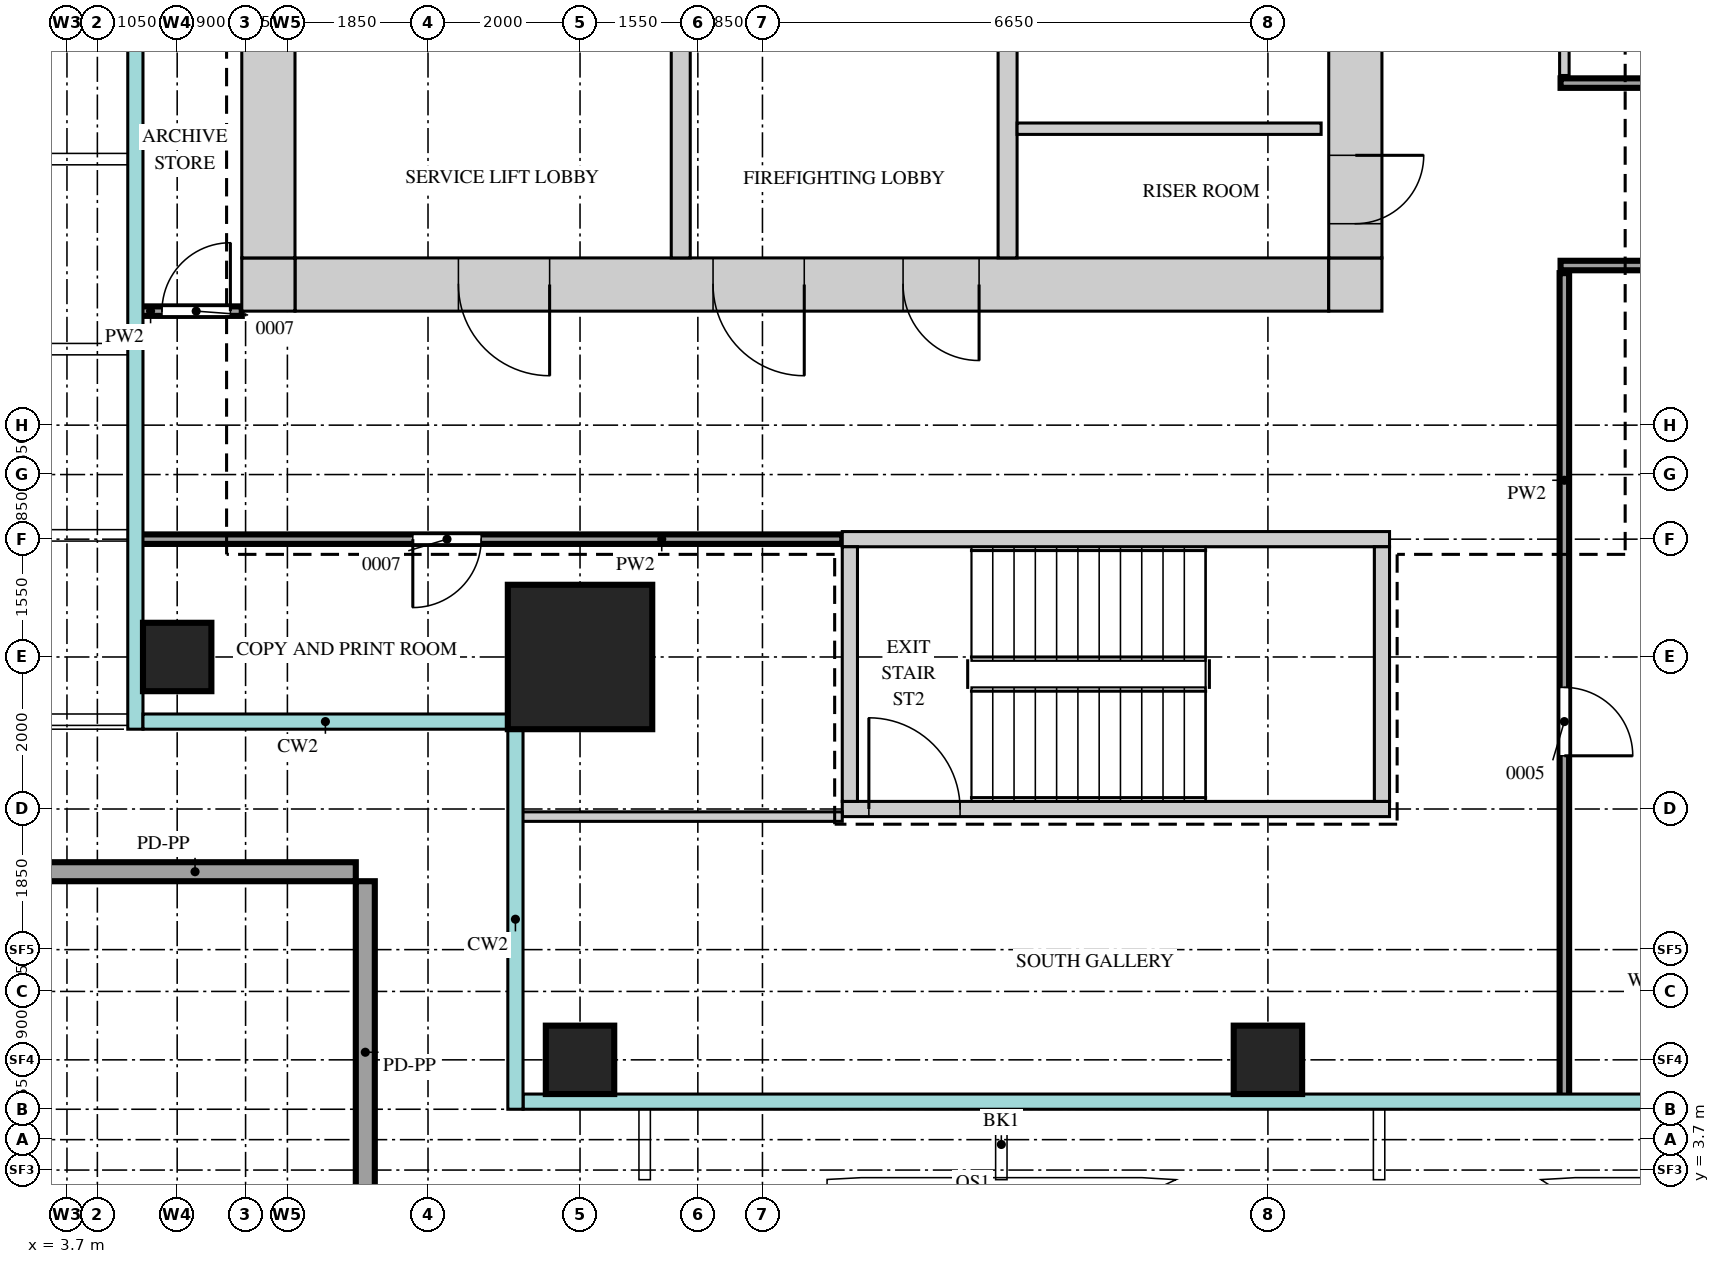
"""IFC4 building model, lengths in metres.
Left out: names, types, materials, properties, quantities, classifications, styles, units other than length and angle.
Written with IfcOpenShell. Run it as: python <this file> out.ifc"""

import sys

from ifc_helpers import new_model, si_unit, direction, frame, frame_2d, origin, origin_2d, place, context, subcontext, project, spatial, rectangle, extrude, source, transform, mapped, element, fill, save


model = new_model("IFC4")
c1 = context("Model", 3, precision=1e-05, world=origin(), true_north=direction((0.0, 1.0)))
c2 = subcontext(c1, "Body", "Model", "MODEL_VIEW")
j1 = project(units=[si_unit("LENGTHUNIT", "METRE"), si_unit("PLANEANGLEUNIT", "RADIAN")], contexts=[c1])
p1 = place(None, origin())
s1 = spatial("IfcSite", under=j1, at=p1, CompositionType="ELEMENT")
p2 = place(p1, origin())
s2 = spatial("IfcBuilding", under=s1, at=p2, CompositionType="ELEMENT")
p3 = place(p2, frame((0.0, 0.0, 222.2)))
s3 = spatial("IfcBuildingStorey", under=s2, at=p3, CompositionType="ELEMENT", Elevation=222.2)
m1 = source(origin(), c2, "Body", "SweptSolid", [
    extrude(rectangle(XDim=13.6, YDim=0.7, at=frame_2d((6.8, 0.0))), origin(), (0.0, 0.0, 1.0), 3.75),
])
p4 = place(p3, frame((6.7, 15.35, 0.0), z_axis=(0.0, 0.0, 1.0), x_axis=(1.0, 0.0, 0.0)))
e1 = element("IfcWall", 1, at=p4, inside=s3, PredefinedType="SHEAR", context=c2, shape_type="MappedRepresentation", body=[
    mapped(m1, transform((0.0, 0.0, 0.0))),
])
m2 = source(origin(), c2, "Body", "SweptSolid", [
    extrude(rectangle(XDim=1.2, YDim=2.1, at=frame_2d((0.6, 1.05))), frame((0.0, 0.36, 0.0), z_axis=(0.0, -1.0, 0.0), x_axis=(1.0, 0.0, 0.0)), (0.0, 0.0, 1.0), 0.72),
])
p5 = place(p4, frame((5.5, 0.0, 0.0)))
e2 = element("IfcOpeningElement", 2, at=p5, cuts=e1, PredefinedType="OPENING", context=c2, shape_type="MappedRepresentation", body=[
    mapped(m2, transform((0.0, 0.0, 0.0))),
])
p6 = place(p4, frame((2.15, 0.0, 0.0)))
e3 = element("IfcOpeningElement", 3, at=p6, cuts=e1, PredefinedType="OPENING", context=c2, shape_type="MappedRepresentation", body=[
    mapped(m2, transform((0.0, 0.0, 0.0))),
])
m3 = source(origin(), c2, "Body", "SweptSolid", [
    extrude(rectangle(XDim=1.0, YDim=2.1, at=frame_2d((0.5, 1.05))), frame((0.0, 0.36, 0.0), z_axis=(0.0, -1.0, 0.0), x_axis=(1.0, 0.0, 0.0)), (0.0, 0.0, 1.0), 0.72),
])
p7 = place(p4, frame((8.0, 0.0, 0.0)))
e4 = element("IfcOpeningElement", 4, at=p7, cuts=e1, PredefinedType="OPENING", context=c2, shape_type="MappedRepresentation", body=[
    mapped(m3, transform((0.0, 0.0, 0.0))),
])
m4 = source(origin(), c2, "Body", "SweptSolid", [
    extrude(rectangle(XDim=0.7, YDim=0.7, at=frame_2d((0.35, 0.0))), origin(), (0.0, 0.0, 1.0), 3.75),
])
for number, where, z_axis, x_axis in (
    (5, (20.3, 15.35, 0.0), (0.0, 0.0, 1.0), (1.0, 0.0, 0.0)),
    (6, (6.0, 15.35, 0.0), (0.0, 0.0, 1.0), (1.0, 0.0, 0.0)),
):
    element("IfcWall", number, at=place(p3, frame(where, z_axis=z_axis, x_axis=x_axis)), inside=s3, PredefinedType="SHEAR", context=c2, shape_type="MappedRepresentation", body=[
        mapped(m4, transform((0.0, 0.0, 0.0))),
    ])
m5 = source(origin(), c2, "Body", "SweptSolid", [
    extrude(rectangle(XDim=22.6, YDim=0.7, at=frame_2d((11.3, 0.0))), origin(), (0.0, 0.0, 1.0), 3.75),
])
p8 = place(p3, frame((20.65, 15.7, 0.0), z_axis=(0.0, 0.0, 1.0), x_axis=(0.0, 1.0, 0.0)))
e7 = element("IfcWall", 7, at=p8, inside=s3, PredefinedType="SHEAR", context=c2, shape_type="MappedRepresentation", body=[
    mapped(m5, transform((0.0, 0.0, 0.0))),
])
m6 = source(origin(), c2, "Body", "SweptSolid", [
    extrude(rectangle(XDim=1.8, YDim=2.1, at=frame_2d((0.9, 1.05))), frame((0.0, 0.36, 0.0), z_axis=(0.0, -1.0, 0.0), x_axis=(1.0, 0.0, 0.0)), (0.0, 0.0, 1.0), 0.72),
])
p9 = place(p8, frame((10.8, 0.0, 0.0)))
e8 = element("IfcOpeningElement", 8, at=p9, cuts=e7, PredefinedType="OPENING", context=c2, shape_type="MappedRepresentation", body=[
    mapped(m6, transform((0.0, 0.0, 0.0))),
])
m7 = source(origin(), c2, "Body", "SweptSolid", [
    extrude(rectangle(XDim=0.9, YDim=2.1, at=frame_2d((0.45, 1.05))), frame((0.0, 0.36, 0.0), z_axis=(0.0, -1.0, 0.0), x_axis=(1.0, 0.0, 0.0)), (0.0, 0.0, 1.0), 0.72),
])
p10 = place(p8, frame((0.45, 0.0, 0.0)))
e9 = element("IfcOpeningElement", 9, at=p10, cuts=e7, PredefinedType="OPENING", context=c2, shape_type="MappedRepresentation", body=[
    mapped(m7, transform((0.0, 0.0, 0.0))),
])
p11 = place(p8, frame((2.9, 0.0, 0.0)))
e10 = element("IfcOpeningElement", 10, at=p11, cuts=e7, PredefinedType="OPENING", context=c2, shape_type="MappedRepresentation", body=[
    mapped(m7, transform((0.0, 0.0, 0.0))),
])
p12 = place(p8, frame((5.65, 0.0, 0.0)))
e11 = element("IfcOpeningElement", 11, at=p12, cuts=e7, PredefinedType="OPENING", context=c2, shape_type="MappedRepresentation", body=[
    mapped(m7, transform((0.0, 0.0, 0.0))),
])
p13 = place(p3, frame((6.35, 15.7, 0.0), z_axis=(0.0, 0.0, 1.0), x_axis=(0.0, 1.0, 0.0)))
e12 = element("IfcWall", 12, at=p13, inside=s3, PredefinedType="SHEAR", context=c2, shape_type="MappedRepresentation", body=[
    mapped(m5, transform((0.0, 0.0, 0.0))),
])
m8 = source(origin(), c2, "Body", "SweptSolid", [
    extrude(rectangle(XDim=7.2, YDim=0.2, at=frame_2d((3.6, 0.0))), origin(), (0.0, 0.0, 1.0), 3.75),
])
p14 = place(p3, frame((13.9, 12.0, 0.0), z_axis=(0.0, 0.0, 1.0), x_axis=(1.0, 0.0, 0.0)))
e13 = element("IfcWall", 13, at=p14, inside=s3, PredefinedType="SHEAR", context=c2, shape_type="MappedRepresentation", body=[
    mapped(m8, transform((0.0, 0.0, 0.0))),
])
p15 = place(p3, frame((13.9, 8.45, 0.0), z_axis=(0.0, 0.0, 1.0), x_axis=(1.0, 0.0, 0.0)))
e14 = element("IfcWall", 14, at=p15, inside=s3, PredefinedType="SHEAR", context=c2, shape_type="MappedRepresentation", body=[
    mapped(m8, transform((0.0, 0.0, 0.0))),
])
m9 = source(origin(), c2, "Body", "SweptSolid", [
    extrude(rectangle(XDim=1.2, YDim=2.1, at=frame_2d((0.6, 1.05))), frame((0.0, 0.11, 0.0), z_axis=(0.0, -1.0, 0.0), x_axis=(1.0, 0.0, 0.0)), (0.0, 0.0, 1.0), 0.22),
])
p16 = place(p15, frame((0.35, 0.0, 0.0)))
e15 = element("IfcOpeningElement", 15, at=p16, cuts=e14, PredefinedType="OPENING", context=c2, shape_type="MappedRepresentation", body=[
    mapped(m9, transform((0.0, 0.0, 0.0))),
])
m10 = source(origin(), c2, "Body", "SweptSolid", [
    extrude(rectangle(XDim=3.35, YDim=0.2, at=frame_2d((1.675, 0.0))), origin(), (0.0, 0.0, 1.0), 3.75),
])
for number, where, z_axis, x_axis in (
    (16, (21.0, 8.55, 0.0), (0.0, 0.0, 1.0), (0.0, 1.0, 0.0)),
    (17, (14.0, 8.55, 0.0), (0.0, 0.0, 1.0), (0.0, 1.0, 0.0)),
):
    element("IfcWall", number, at=place(p3, frame(where, z_axis=z_axis, x_axis=x_axis)), inside=s3, PredefinedType="SHEAR", context=c2, shape_type="MappedRepresentation", body=[
        mapped(m10, transform((0.0, 0.0, 0.0))),
    ])
m11 = source(origin(), c2, "Body", "SweptSolid", [
    extrude(rectangle(XDim=3.5, YDim=0.25, at=frame_2d((1.75, 0.0))), origin(), (0.0, 0.0, 1.0), 3.75),
])
for number, where, z_axis, x_axis in (
    (18, (16.075, 15.7, 0.0), (0.0, 0.0, 1.0), (0.0, 1.0, 0.0)),
    (19, (11.775, 15.7, 0.0), (0.0, 0.0, 1.0), (0.0, 1.0, 0.0)),
):
    element("IfcWall", number, at=place(p3, frame(where, z_axis=z_axis, x_axis=x_axis)), inside=s3, PredefinedType="STANDARD", context=c2, shape_type="MappedRepresentation", body=[
        mapped(m11, transform((0.0, 0.0, 0.0))),
    ])
m12 = source(origin(), c2, "Body", "SweptSolid", [
    extrude(rectangle(XDim=1.9, YDim=1.9, at=origin_2d()), origin(), (0.0, 0.0, 1.0), 4.0),
])
p17 = place(p3, frame((10.45, 10.45, 0.0), z_axis=(0.0, 0.0, 1.0), x_axis=(1.0, 0.0, 0.0)))
e20 = element("IfcColumn", 20, at=p17, inside=s3, PredefinedType="COLUMN", context=c2, shape_type="MappedRepresentation", body=[
    mapped(m12, transform((0.0, 0.0, 0.0))),
])
m13 = source(origin(), c2, "Body", "SweptSolid", [
    extrude(rectangle(XDim=0.9, YDim=0.9, at=origin_2d()), origin(), (0.0, 0.0, 1.0), 3.75),
])
for number, where, z_axis, x_axis in (
    (21, (10.45, 5.15, 0.0), (0.0, 0.0, 1.0), (1.0, 0.0, 0.0)),
    (22, (19.5, 5.15, 0.0), (0.0, 0.0, 1.0), (1.0, 0.0, 0.0)),
    (23, (5.15, 10.45, 0.0), (0.0, 0.0, 1.0), (1.0, 0.0, 0.0)),
):
    element("IfcColumn", number, at=place(p3, frame(where, z_axis=z_axis, x_axis=x_axis)), inside=s3, PredefinedType="COLUMN", context=c2, shape_type="MappedRepresentation", body=[
        mapped(m13, transform((0.0, 0.0, 0.0))),
    ])
m14 = source(origin(), c2, "Body", "SweptSolid", [
    extrude(rectangle(XDim=4.5, YDim=0.25, at=frame_2d((2.25, 0.0))), origin(), (0.0, 0.0, 1.0), 1.1),
])
p18 = place(p3, frame((7.625, 7.5, 0.0), z_axis=(0.0, 0.0, 1.0), x_axis=(0.0, -1.0, 0.0)))
e24 = element("IfcWall", 24, at=p18, inside=s3, PredefinedType="SOLIDWALL", context=c2, shape_type="MappedRepresentation", body=[
    mapped(m14, transform((0.0, 0.0, 0.0))),
])
m15 = source(origin(), c2, "Body", "SweptSolid", [
    extrude(rectangle(XDim=4.23, YDim=0.25, at=frame_2d((2.115, 0.0))), origin(), (0.0, 0.0, 1.0), 1.1),
])
p19 = place(p3, frame((3.27, 7.625, 0.0), z_axis=(0.0, 0.0, 1.0), x_axis=(1.0, 0.0, 0.0)))
e25 = element("IfcWall", 25, at=p19, inside=s3, PredefinedType="SOLIDWALL", context=c2, shape_type="MappedRepresentation", body=[
    mapped(m15, transform((0.0, 0.0, 0.0))),
])
m16 = source(origin(), c2, "Body", "SweptSolid", [
    extrude(rectangle(XDim=10.85, YDim=0.125, at=frame_2d((5.425, 0.0))), origin(), (0.0, 0.0, 1.0), 3.8),
])
p20 = place(p3, frame((23.4, 4.65, 0.0), z_axis=(0.0, 0.0, 1.0), x_axis=(0.0, 1.0, 0.0)))
e26 = element("IfcWall", 26, at=p20, inside=s3, PredefinedType="PARTITIONING", context=c2, shape_type="MappedRepresentation", body=[
    mapped(m16, transform((0.0, 0.0, 0.0))),
])
m17 = source(origin(), c2, "Body", "SweptSolid", [
    extrude(rectangle(XDim=0.9, YDim=2.1, at=frame_2d((0.45, 1.05))), frame((0.0, 0.073, 0.0), z_axis=(0.0, -1.0, 0.0), x_axis=(1.0, 0.0, 0.0)), (0.0, 0.0, 1.0), 0.145),
])
p21 = place(p20, frame((4.5, 0.0, 0.0)))
e27 = element("IfcOpeningElement", 27, at=p21, cuts=e26, PredefinedType="OPENING", context=c2, shape_type="MappedRepresentation", body=[
    mapped(m17, transform((0.0, 0.0, 0.0))),
])
m18 = source(origin(), c2, "Body", "SweptSolid", [
    extrude(rectangle(XDim=4.25, YDim=0.125, at=frame_2d((2.125, 0.0))), origin(), (0.0, 0.0, 1.0), 3.8),
])
p22 = place(p3, frame((9.65, 8.35, 0.0), z_axis=(0.0, 0.0, 1.0), x_axis=(1.0, 0.0, 0.0)))
e28 = element("IfcWall", 28, at=p22, inside=s3, PredefinedType="PARTITIONING", context=c2, shape_type="MappedRepresentation", body=[
    mapped(m18, transform((0.0, 0.0, 0.0))),
])
m19 = source(origin(), c2, "Body", "SweptSolid", [
    extrude(rectangle(XDim=9.25, YDim=0.125, at=frame_2d((4.625, 0.0))), origin(), (0.0, 0.0, 1.0), 3.8),
])
p23 = place(p3, frame((4.65, 12.0, 0.0), z_axis=(0.0, 0.0, 1.0), x_axis=(1.0, 0.0, 0.0)))
e29 = element("IfcWall", 29, at=p23, inside=s3, PredefinedType="PARTITIONING", context=c2, shape_type="MappedRepresentation", body=[
    mapped(m19, transform((0.0, 0.0, 0.0))),
])
p24 = place(p23, frame((3.6, 0.0, 0.0)))
e30 = element("IfcOpeningElement", 30, at=p24, cuts=e29, PredefinedType="OPENING", context=c2, shape_type="MappedRepresentation", body=[
    mapped(m17, transform((0.0, 0.0, 0.0))),
])
m20 = source(origin(), c2, "Body", "SweptSolid", [
    extrude(rectangle(XDim=1.35, YDim=0.125, at=frame_2d((0.675, 0.0))), origin(), (0.0, 0.0, 1.0), 3.8),
])
p25 = place(p3, frame((4.65, 15.0, 0.0), z_axis=(0.0, 0.0, 1.0), x_axis=(1.0, 0.0, 0.0)))
e31 = element("IfcWall", 31, at=p25, inside=s3, PredefinedType="PARTITIONING", context=c2, shape_type="MappedRepresentation", body=[
    mapped(m20, transform((0.0, 0.0, 0.0))),
])
p26 = place(p25, frame((0.3, 0.0, 0.0)))
e32 = element("IfcOpeningElement", 32, at=p26, cuts=e31, PredefinedType="OPENING", context=c2, shape_type="MappedRepresentation", body=[
    mapped(m17, transform((0.0, 0.0, 0.0))),
])
m21 = source(origin(), c2, "Body", "SweptSolid", [
    extrude(rectangle(XDim=26.0, YDim=0.125, at=frame_2d((13.0, 0.0))), origin(), (0.0, 0.0, 1.0), 3.8),
])
p27 = place(p3, frame((23.35, 15.6, 0.0), z_axis=(0.0, 0.0, 1.0), x_axis=(1.0, 0.0, 0.0)))
e33 = element("IfcWall", 33, at=p27, inside=s3, PredefinedType="PARTITIONING", context=c2, shape_type="MappedRepresentation", body=[
    mapped(m21, transform((0.0, 0.0, 0.0))),
])
p28 = place(p27, frame((4.05, 0.0, 0.0)))
e34 = element("IfcOpeningElement", 34, at=p28, cuts=e33, PredefinedType="OPENING", context=c2, shape_type="MappedRepresentation", body=[
    mapped(m17, transform((0.0, 0.0, 0.0))),
])
m22 = source(origin(), c2, "Body", "SweptSolid", [
    extrude(rectangle(XDim=1.0, YDim=2.1, at=frame_2d((0.5, 1.05))), frame((0.0, 0.073, 0.0), z_axis=(0.0, -1.0, 0.0), x_axis=(1.0, 0.0, 0.0)), (0.0, 0.0, 1.0), 0.145),
])
p29 = place(p27, frame((6.85, 0.0, 0.0)))
e35 = element("IfcOpeningElement", 35, at=p29, cuts=e33, PredefinedType="OPENING", context=c2, shape_type="MappedRepresentation", body=[
    mapped(m22, transform((0.0, 0.0, 0.0))),
])
p30 = place(p27, frame((9.25, 0.0, 0.0)))
e36 = element("IfcOpeningElement", 36, at=p30, cuts=e33, PredefinedType="OPENING", context=c2, shape_type="MappedRepresentation", body=[
    mapped(m17, transform((0.0, 0.0, 0.0))),
])
p31 = place(p27, frame((15.1, 0.0, 0.0)))
e37 = element("IfcOpeningElement", 37, at=p31, cuts=e33, PredefinedType="OPENING", context=c2, shape_type="MappedRepresentation", body=[
    mapped(m17, transform((0.0, 0.0, 0.0))),
])
p32 = place(p27, frame((22.6, 0.0, 0.0)))
e38 = element("IfcOpeningElement", 38, at=p32, cuts=e33, PredefinedType="OPENING", context=c2, shape_type="MappedRepresentation", body=[
    mapped(m17, transform((0.0, 0.0, 0.0))),
])
m23 = source(origin(), c2, "Body", "SweptSolid", [
    extrude(rectangle(XDim=4.0, YDim=0.15, at=frame_2d((2.0, 0.0))), origin(), (0.0, 0.0, 1.0), 3.8),
])
p33 = place(p3, frame((16.2, 17.4, 0.0), z_axis=(0.0, 0.0, 1.0), x_axis=(1.0, 0.0, 0.0)))
e39 = element("IfcWall", 39, at=p33, inside=s3, PredefinedType="PARTITIONING", context=c2, shape_type="MappedRepresentation", body=[
    mapped(m23, transform((0.0, 0.0, 0.0))),
])
p34 = place(p3, frame((23.35, 18.0, 0.0), z_axis=(0.0, 0.0, 1.0), x_axis=(1.0, 0.0, 0.0)))
e40 = element("IfcWall", 40, at=p34, inside=s3, PredefinedType="PARTITIONING", context=c2, shape_type="MappedRepresentation", body=[
    mapped(m21, transform((0.0, 0.0, 0.0))),
])
m24 = source(origin(), c2, "Body", "SweptSolid", [
    extrude(rectangle(XDim=1.2, YDim=2.1, at=frame_2d((0.6, 1.05))), frame((0.0, 0.073, 0.0), z_axis=(0.0, -1.0, 0.0), x_axis=(1.0, 0.0, 0.0)), (0.0, 0.0, 1.0), 0.145),
])
p35 = place(p34, frame((11.55, 0.0, 0.0)))
e41 = element("IfcOpeningElement", 41, at=p35, cuts=e40, PredefinedType="OPENING", context=c2, shape_type="MappedRepresentation", body=[
    mapped(m24, transform((0.0, 0.0, 0.0))),
])
p36 = place(p34, frame((21.3, 0.0, 0.0)))
e42 = element("IfcOpeningElement", 42, at=p36, cuts=e40, PredefinedType="OPENING", context=c2, shape_type="MappedRepresentation", body=[
    mapped(m24, transform((0.0, 0.0, 0.0))),
])
m25 = source(origin(), c2, "Body", "SweptSolid", [
    extrude(rectangle(XDim=18.4, YDim=0.125, at=frame_2d((9.2, 0.0))), origin(), (0.0, 0.0, 1.0), 3.8),
])
p37 = place(p3, frame((23.4, 18.1, 0.0), z_axis=(0.0, 0.0, 1.0), x_axis=(0.0, 1.0, 0.0)))
e43 = element("IfcWall", 43, at=p37, inside=s3, PredefinedType="PARTITIONING", context=c2, shape_type="MappedRepresentation", body=[
    mapped(m25, transform((0.0, 0.0, 0.0))),
])
p38 = place(p37, frame((8.6, 0.0, 0.0)))
e44 = element("IfcOpeningElement", 44, at=p38, cuts=e43, PredefinedType="OPENING", context=c2, shape_type="MappedRepresentation", body=[
    mapped(m24, transform((0.0, 0.0, 0.0))),
])
m26 = source(origin(), c2, "Body", "SweptSolid", [
    extrude(rectangle(XDim=0.9, YDim=2.1, at=frame_2d((0.45, 1.05))), frame((0.0, 0.3, 0.0), z_axis=(0.0, -1.0, 0.0), x_axis=(1.0, 0.0, 0.0)), (0.0, 0.0, 1.0), 0.6),
])
p39 = place(p10, origin())
e45 = element("IfcDoor", 45, at=p39, inside=s3, OperationType="SINGLE_SWING_RIGHT", PredefinedType="DOOR", context=c2, shape_type="MappedRepresentation", body=[
    mapped(m26, transform((0.0, 0.0, 0.0))),
])
fill(e9, e45)
m27 = source(origin(), c2, "Body", "SweptSolid", [
    extrude(rectangle(XDim=1.2, YDim=2.1, at=frame_2d((0.6, 1.05))), frame((0.0, 0.3, 0.0), z_axis=(0.0, -1.0, 0.0), x_axis=(1.0, 0.0, 0.0)), (0.0, 0.0, 1.0), 0.6),
])
p40 = place(p5, origin())
e46 = element("IfcDoor", 46, at=p40, inside=s3, OperationType="SINGLE_SWING_RIGHT", PredefinedType="DOOR", context=c2, shape_type="MappedRepresentation", body=[
    mapped(m27, transform((0.0, 0.0, 0.0))),
])
fill(e2, e46)
p41 = place(p6, origin())
e47 = element("IfcDoor", 47, at=p41, inside=s3, OperationType="SINGLE_SWING_RIGHT", PredefinedType="DOOR", context=c2, shape_type="MappedRepresentation", body=[
    mapped(m27, transform((0.0, 0.0, 0.0))),
])
fill(e3, e47)
m28 = source(origin(), c2, "Body", "SweptSolid", [
    extrude(rectangle(XDim=1.0, YDim=2.1, at=frame_2d((0.5, 1.05))), frame((0.0, 0.3, 0.0), z_axis=(0.0, -1.0, 0.0), x_axis=(1.0, 0.0, 0.0)), (0.0, 0.0, 1.0), 0.6),
])
p42 = place(p7, origin())
e48 = element("IfcDoor", 48, at=p42, inside=s3, OperationType="SINGLE_SWING_RIGHT", PredefinedType="DOOR", context=c2, shape_type="MappedRepresentation", body=[
    mapped(m28, transform((0.0, 0.0, 0.0))),
])
fill(e4, e48)
m29 = source(origin(), c2, "Body", "SweptSolid", [
    extrude(rectangle(XDim=0.9, YDim=2.1, at=frame_2d((0.45, 1.05))), frame((0.0, 0.025, 0.0), z_axis=(0.0, -1.0, 0.0), x_axis=(1.0, 0.0, 0.0)), (0.0, 0.0, 1.0), 0.05),
])
p43 = place(p26, origin())
e49 = element("IfcDoor", 49, at=p43, inside=s3, OperationType="SINGLE_SWING_LEFT", PredefinedType="DOOR", context=c2, shape_type="MappedRepresentation", body=[
    mapped(m29, transform((0.0, 0.0, 0.0))),
])
fill(e32, e49)
p44 = place(p24, origin())
e50 = element("IfcDoor", 50, at=p44, inside=s3, OperationType="SINGLE_SWING_LEFT", PredefinedType="DOOR", context=c2, shape_type="MappedRepresentation", body=[
    mapped(m29, transform((0.0, 0.0, 0.0))),
])
fill(e30, e50)
p45 = place(p21, origin())
e51 = element("IfcDoor", 51, at=p45, inside=s3, OperationType="SINGLE_SWING_LEFT", PredefinedType="DOOR", context=c2, shape_type="MappedRepresentation", body=[
    mapped(m29, transform((0.0, 0.0, 0.0))),
])
fill(e27, e51)
m30 = source(origin(), c2, "Body", "SweptSolid", [
    extrude(rectangle(XDim=1.2, YDim=2.1, at=frame_2d((0.6, 1.05))), frame((0.0, 0.025, 0.0), z_axis=(0.0, -1.0, 0.0), x_axis=(1.0, 0.0, 0.0)), (0.0, 0.0, 1.0), 0.05),
])
p46 = place(p16, origin())
e52 = element("IfcDoor", 52, at=p46, inside=s3, OperationType="SINGLE_SWING_RIGHT", PredefinedType="DOOR", context=c2, shape_type="MappedRepresentation", body=[
    mapped(m30, transform((0.0, 0.0, 0.0))),
])
fill(e15, e52)
save(model, sys.argv[1])
